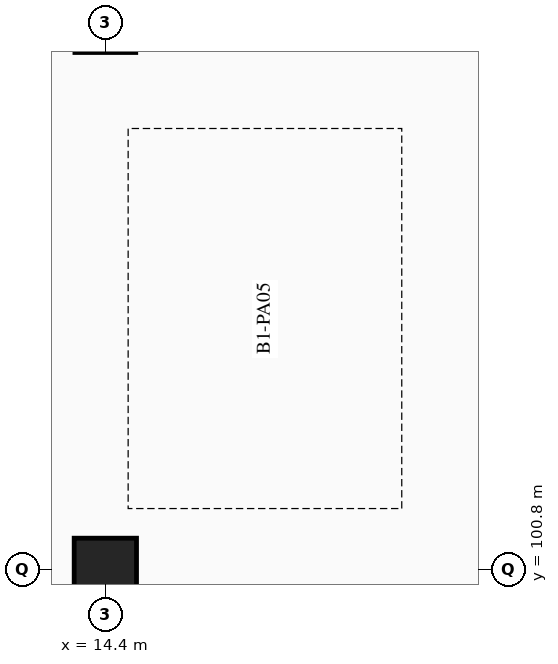
"""IFC4 building model, lengths in metres.
Left out: names, types, materials, properties, quantities, classifications, styles, units other than length and angle.
Written with IfcOpenShell. Run it as: python <this file> out.ifc"""

import sys

from ifc_helpers import new_model, si_unit, direction, frame, origin, origin_2d, place, context, subcontext, project, spatial, rectangle, extrude, element, save


model = new_model("IFC4")
c1 = context("Model", 3, precision=1e-05, world=origin(), true_north=direction((0.0, 1.0)))
c2 = subcontext(c1, "Body", "Model", "MODEL_VIEW")
j1 = project(units=[si_unit("LENGTHUNIT", "METRE"), si_unit("PLANEANGLEUNIT", "RADIAN")], contexts=[c1])
p1 = place(None, origin())
s1 = spatial("IfcSite", under=j1, at=p1, CompositionType="ELEMENT")
p2 = place(p1, origin())
s2 = spatial("IfcBuilding", under=s1, at=p2, CompositionType="ELEMENT")
p3 = place(p2, frame((0.0, 0.0, -4.5)))
s3 = spatial("IfcBuildingStorey", under=s2, at=p3, CompositionType="ELEMENT", Elevation=-4.5)
p4 = place(p3, frame((14.4, 100.8, -0.45), z_axis=(0.0, 0.0, 1.0), x_axis=(1.0, 0.0, 0.0)))
e1 = element("IfcColumn", 1, at=p4, inside=s3, PredefinedType="COLUMN", context=c2, shape_type="SweptSolid", body=[
    extrude(rectangle(XDim=0.82, YDim=0.82, at=origin_2d()), origin(), (0.0, 0.0, 1.0), 4.95),
])
p5 = place(p3, frame((14.4, 108.0, -0.45), z_axis=(0.0, 0.0, 1.0), x_axis=(1.0, 0.0, 0.0)))
e2 = element("IfcColumn", 2, at=p5, inside=s3, PredefinedType="COLUMN", context=c2, shape_type="SweptSolid", body=[
    extrude(rectangle(XDim=0.8, YDim=0.8, at=origin_2d()), origin(), (0.0, 0.0, 1.0), 4.95),
])
save(model, sys.argv[1])
